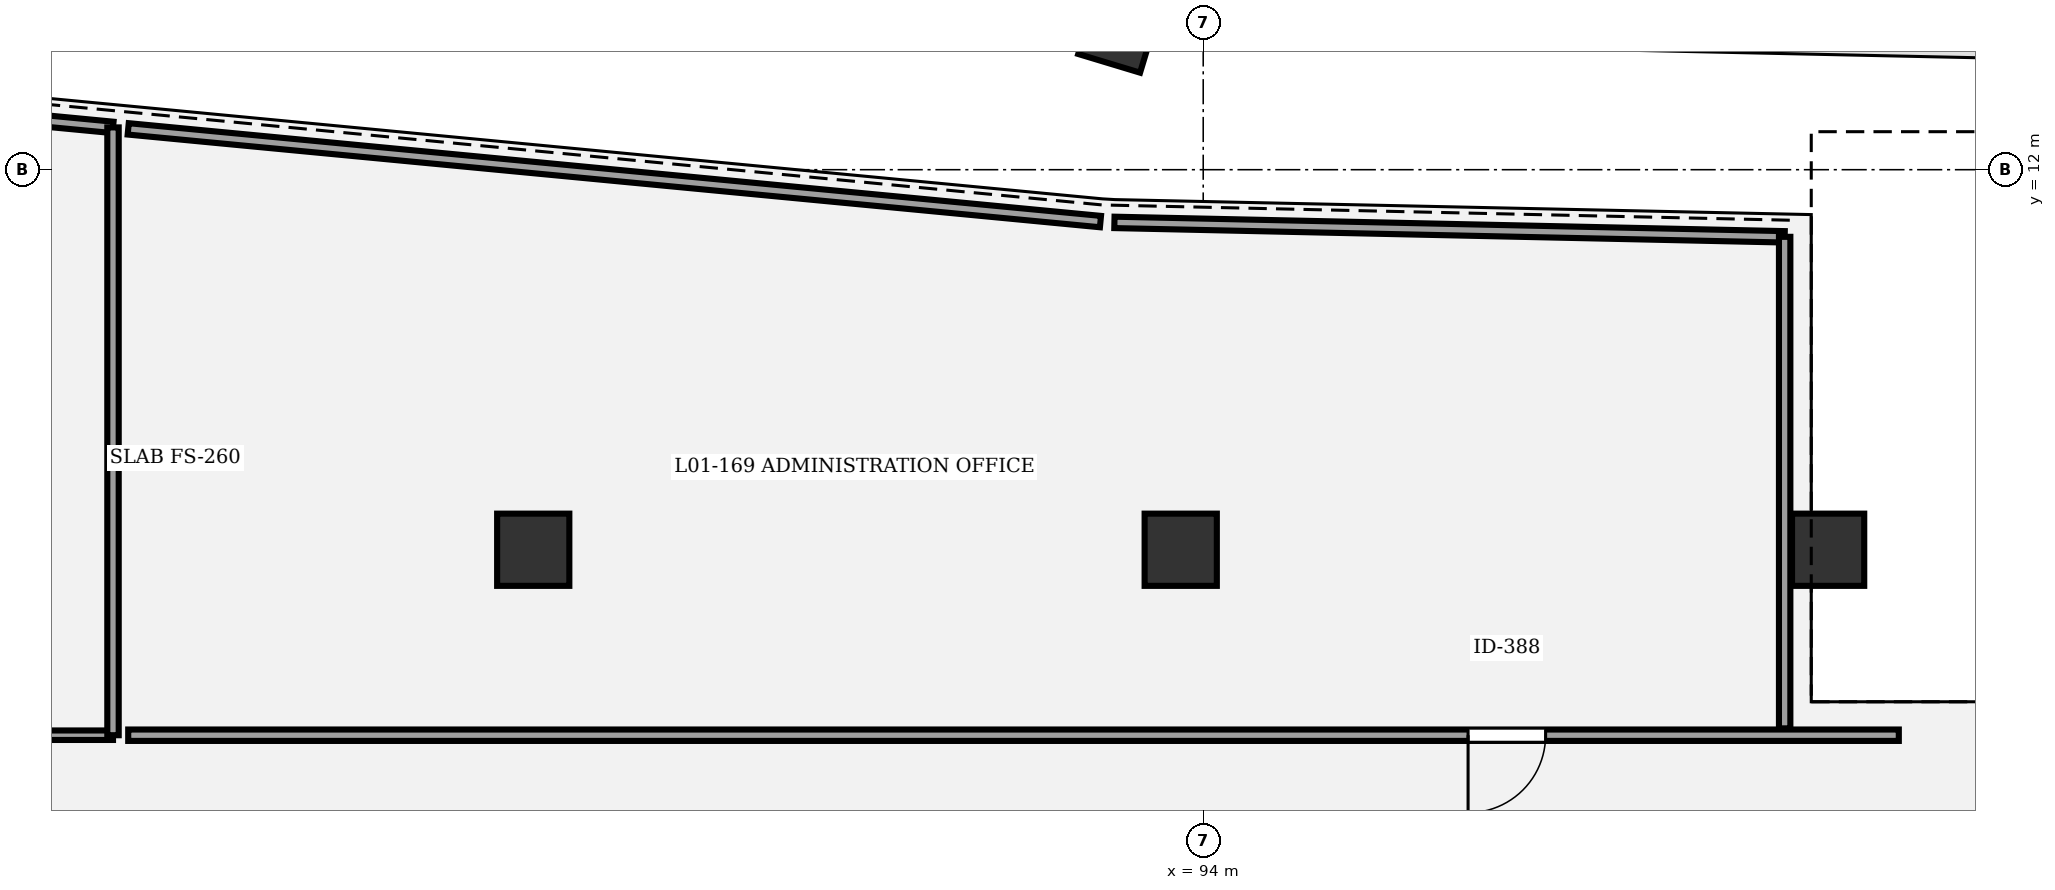
"""IFC4 building model, lengths in metres.
Left out: names, types, materials, properties, quantities, classifications, styles, units other than length and angle.
Written with IfcOpenShell. Run it as: python <this file> out.ifc"""

import sys

from ifc_helpers import new_model, si_unit, direction, frame, frame_2d, origin, origin_2d, place, context, subcontext, project, spatial, rectangle, circle, extrude, element, fill, save


model = new_model("IFC4")
c1 = context("Model", 3, precision=1e-05, world=origin(), true_north=direction((0.0, 1.0)))
c2 = subcontext(c1, "Body", "Model", "MODEL_VIEW")
j1 = project(units=[si_unit("LENGTHUNIT", "METRE"), si_unit("PLANEANGLEUNIT", "RADIAN")], contexts=[c1])
p1 = place(None, origin())
s1 = spatial("IfcSite", under=j1, at=p1, CompositionType="ELEMENT")
p2 = place(p1, origin())
s2 = spatial("IfcBuilding", under=s1, at=p2, CompositionType="ELEMENT")
p3 = place(p2, frame((0.0, 0.0, 5.4)))
s3 = spatial("IfcBuildingStorey", under=s2, at=p3, CompositionType="ELEMENT", Elevation=5.4)
p4 = place(p3, frame((92.885, 13.806, 0.0), z_axis=(0.0, 0.0, 1.0), x_axis=(-0.289198876314, -0.957269037387, 0.0)))
e1 = element("IfcColumn", 1, at=p4, inside=s3, PredefinedType="COLUMN", context=c2, shape_type="SweptSolid", body=[
    extrude(rectangle(XDim=0.85, YDim=0.85, at=origin_2d()), origin(), (0.0, 0.0, 1.0), 4.8),
])
for number, where, z_axis, x_axis in (
    (2, (85.185, 7.0, 0.0), (0.0, 0.0, 1.0), (1.0, 0.0, 0.0)),
    (3, (93.704, 7.0, 0.0), (0.0, 0.0, 1.0), (1.0, 0.0, 0.0)),
    (4, (102.222, 7.0, 0.0), (0.0, 0.0, 1.0), (1.0, 0.0, 0.0)),
):
    element("IfcColumn", number, at=place(p3, frame(where, z_axis=z_axis, x_axis=x_axis)), inside=s3, PredefinedType="COLUMN", context=c2, shape_type="SweptSolid", body=[
        extrude(circle(Radius=0.475, at=origin_2d()), origin(), (0.0, 0.0, 1.0), 4.8),
    ])
p5 = place(p3, frame((79.656, 4.56, 0.0), z_axis=(0.0, 0.0, 1.0), x_axis=(-1.0, 0.0, 0.0)))
e5 = element("IfcWall", 5, at=p5, inside=s3, PredefinedType="PARTITIONING", context=c2, shape_type="SweptSolid", body=[
    extrude(rectangle(XDim=23.296, YDim=0.125, at=frame_2d((11.648, 0.0))), origin(), (0.0, 0.0, 1.0), 3.55),
])
p6 = place(p5, frame((14.409, 0.0, 0.0)))
e6 = element("IfcOpeningElement", 6, at=p6, cuts=e5, PredefinedType="OPENING", context=c2, shape_type="SweptSolid", body=[
    extrude(rectangle(XDim=0.98, YDim=2.3, at=frame_2d((0.49, 1.15))), frame((0.0, 0.073, 0.0), z_axis=(0.0, -1.0, 0.0), x_axis=(1.0, 0.0, 0.0)), (0.0, 0.0, 1.0), 0.145),
])
p7 = place(p3, frame((103.152, 4.56, 0.0), z_axis=(0.0, 0.0, 1.0), x_axis=(-1.0, 0.0, 0.0)))
e7 = element("IfcWall", 7, at=p7, inside=s3, PredefinedType="PARTITIONING", context=c2, shape_type="SweptSolid", body=[
    extrude(rectangle(XDim=23.296, YDim=0.15, at=frame_2d((11.648, 0.0))), origin(), (0.0, 0.0, 1.0), 3.55),
])
p8 = place(p7, frame((4.647, 0.0, 0.0)))
e8 = element("IfcOpeningElement", 8, at=p8, cuts=e7, PredefinedType="OPENING", context=c2, shape_type="SweptSolid", body=[
    extrude(rectangle(XDim=1.02, YDim=2.3, at=frame_2d((0.51, 1.15))), frame((0.0, 0.085, 0.0), z_axis=(0.0, -1.0, 0.0), x_axis=(1.0, 0.0, 0.0)), (0.0, 0.0, 1.0), 0.17),
])
p9 = place(p3, frame((77.69, 12.744, 0.0), z_axis=(0.0, 0.0, 1.0), x_axis=(0.995483241572, -0.094937430712, 0.0)))
e9 = element("IfcWall", 9, at=p9, inside=s3, PredefinedType="PARTITIONING", context=c2, shape_type="SweptSolid", body=[
    extrude(rectangle(XDim=1.975, YDim=0.15, at=frame_2d((0.988, 0.0))), origin(), (0.0, 0.0, 1.0), 3.55),
])
p10 = place(p3, frame((79.656, 12.556, 0.0), z_axis=(0.0, 0.0, 1.0), x_axis=(0.0, -1.0, 0.0)))
e10 = element("IfcWall", 10, at=p10, inside=s3, PredefinedType="PARTITIONING", context=c2, shape_type="SweptSolid", body=[
    extrude(rectangle(XDim=7.996, YDim=0.15, at=frame_2d((3.998, 0.0))), origin(), (0.0, 0.0, 1.0), 3.55),
])
p11 = place(p3, frame((92.832, 11.307, 0.0), z_axis=(0.0, 0.0, 1.0), x_axis=(0.999768109674, -0.021534318641, 0.0)))
e11 = element("IfcWall", 11, at=p11, inside=s3, PredefinedType="PARTITIONING", context=c2, shape_type="SweptSolid", body=[
    extrude(rectangle(XDim=8.82, YDim=0.15, at=frame_2d((4.41, 0.0))), origin(), (0.0, 0.0, 1.0), 3.55),
])
p12 = place(p3, frame((101.65, 11.117, 0.0), z_axis=(0.0, 0.0, 1.0), x_axis=(0.0, -1.0, 0.0)))
e12 = element("IfcWall", 12, at=p12, inside=s3, PredefinedType="PARTITIONING", context=c2, shape_type="SweptSolid", body=[
    extrude(rectangle(XDim=6.467, YDim=0.15, at=frame_2d((3.233, 0.0))), origin(), (0.0, 0.0, 1.0), 3.55),
])
p13 = place(p3, frame((79.856, 12.537, 0.0), z_axis=(0.0, 0.0, 1.0), x_axis=(0.995483253835, -0.094937302124, 0.0)))
e13 = element("IfcWall", 13, at=p13, inside=s3, PredefinedType="PARTITIONING", context=c2, shape_type="SweptSolid", body=[
    extrude(rectangle(XDim=12.85, YDim=0.15, at=frame_2d((6.425, 0.0))), origin(), (0.0, 0.0, 1.0), 3.55),
])
p14 = place(p8, origin())
e14 = element("IfcDoor", 14, at=p14, inside=s3, OperationType="SINGLE_SWING_RIGHT", PredefinedType="DOOR", context=c2, shape_type="SweptSolid", body=[
    extrude(rectangle(XDim=1.02, YDim=2.3, at=frame_2d((0.51, 1.15))), frame((0.0, 0.025, 0.0), z_axis=(0.0, -1.0, 0.0), x_axis=(1.0, 0.0, 0.0)), (0.0, 0.0, 1.0), 0.05),
])
fill(e8, e14)
save(model, sys.argv[1])
